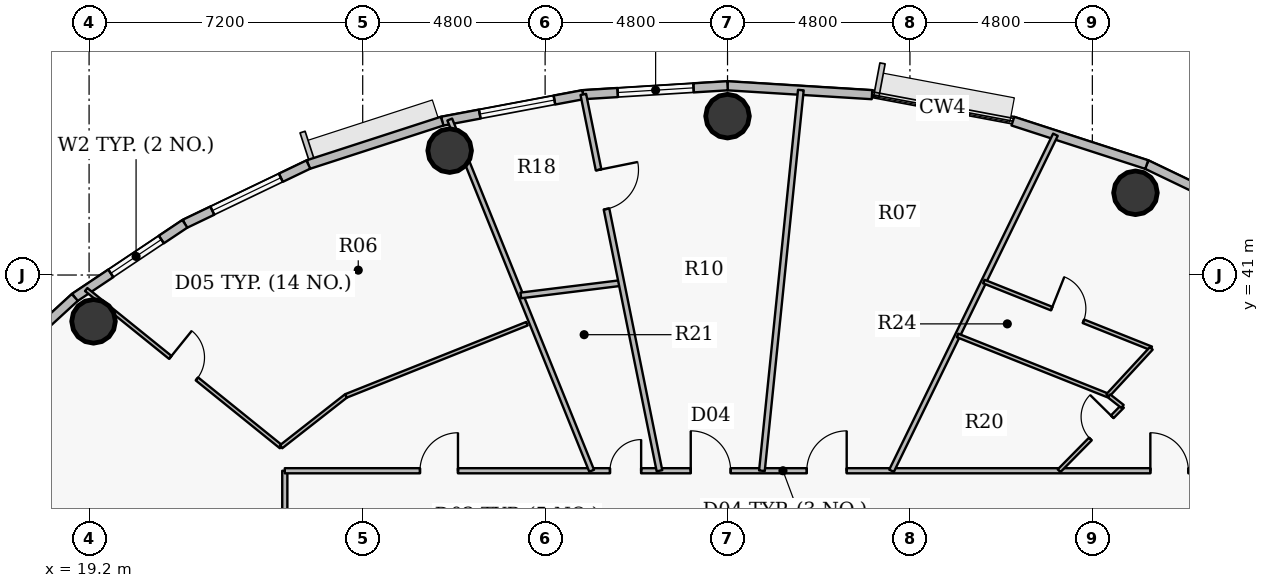
"""IFC4 building model, lengths in metres.
Left out: names, types, materials, properties, quantities, classifications, styles, units other than length and angle.
Written with IfcOpenShell. Run it as: python <this file> out.ifc"""

import sys

from ifc_helpers import new_model, si_unit, direction, frame, frame_2d, origin, origin_2d, place, context, subcontext, project, spatial, rectangle, hollow_circle, extrude, source, transform, mapped, element, fill, save


model = new_model("IFC4")
c1 = context("Model", 3, precision=1e-05, world=origin(), true_north=direction((0.0, 1.0)))
c2 = subcontext(c1, "Body", "Model", "MODEL_VIEW")
j1 = project(units=[si_unit("LENGTHUNIT", "METRE"), si_unit("PLANEANGLEUNIT", "RADIAN")], contexts=[c1])
p1 = place(None, origin())
s1 = spatial("IfcSite", under=j1, at=p1, CompositionType="ELEMENT")
p2 = place(p1, origin())
s2 = spatial("IfcBuilding", under=s1, at=p2, CompositionType="ELEMENT")
p3 = place(p2, frame((0.0, 0.0, 225.3)))
s3 = spatial("IfcBuildingStorey", under=s2, at=p3, CompositionType="ELEMENT", Elevation=225.3)
for number, where, z_axis, x_axis in (
    (1, (46.735, 43.164, 0.0), (0.0, 0.0, 1.0), (1.0, 0.0, 0.0)),
    (2, (36.0, 45.18, 0.0), (0.0, 0.0, 1.0), (1.0, 0.0, 0.0)),
    (3, (28.688, 44.273, 0.0), (0.0, 0.0, 1.0), (1.0, 0.0, 0.0)),
    (4, (19.317, 39.781, 0.0), (0.0, 0.0, 1.0), (1.0, 0.0, 0.0)),
):
    element("IfcColumn", number, at=place(p3, frame(where, z_axis=z_axis, x_axis=x_axis)), inside=s3, PredefinedType="COLUMN", context=c2, shape_type="SweptSolid", body=[
        extrude(hollow_circle(Radius=0.575, WallThickness=0.036, at=origin_2d()), origin(), (0.0, 0.0, 1.0), 3.75),
    ])
p4 = place(p3, frame((47.031, 43.906, 0.0), z_axis=(0.0, 0.0, 1.0), x_axis=(0.901598104751, -0.432574684313, 0.0)))
e5 = element("IfcWall", 5, at=p4, inside=s3, PredefinedType="SOLIDWALL", context=c2, shape_type="SweptSolid", body=[
    extrude(rectangle(XDim=3.604, YDim=0.24, at=frame_2d((1.802, 0.0))), origin(), (0.0, 0.0, 1.0), 3.5),
])
p5 = place(p3, frame((43.509, 45.049, 0.0), z_axis=(0.0, 0.0, 1.0), x_axis=(0.951210789182, -0.308541787354, 0.0)))
e6 = element("IfcWall", 6, at=p5, inside=s3, PredefinedType="SOLIDWALL", context=c2, shape_type="SweptSolid", body=[
    extrude(rectangle(XDim=3.702, YDim=0.24, at=frame_2d((1.851, 0.0))), origin(), (0.0, 0.0, 1.0), 3.5),
])
p6 = place(p3, frame((36.0, 45.98, 0.0), z_axis=(0.0, 0.0, 1.0), x_axis=(0.998108785312, -0.06147237333, 0.0)))
e7 = element("IfcWall", 7, at=p6, inside=s3, PredefinedType="SOLIDWALL", context=c2, shape_type="SweptSolid", body=[
    extrude(rectangle(XDim=3.809, YDim=0.24, at=frame_2d((1.904, 0.0))), origin(), (0.0, 0.0, 1.0), 3.5),
])
p7 = place(p3, frame((32.198, 45.746, 0.0), z_axis=(0.0, 0.0, 1.0), x_axis=(0.998108785312, 0.06147237333, 0.0)))
e8 = element("IfcWall", 8, at=p7, inside=s3, PredefinedType="SOLIDWALL", context=c2, shape_type="SweptSolid", body=[
    extrude(rectangle(XDim=3.809, YDim=0.24, at=frame_2d((1.904, 0.0))), origin(), (0.0, 0.0, 1.0), 3.5),
])
p8 = place(p7, frame((0.913, 0.0, 0.9)))
e9 = element("IfcOpeningElement", 9, at=p8, cuts=e8, PredefinedType="OPENING", context=c2, shape_type="SweptSolid", body=[
    extrude(rectangle(XDim=2.0, YDim=1.75, at=origin_2d()), frame((1.0, 0.13, 0.875), z_axis=(0.0, -1.0, 0.0), x_axis=(1.0, 0.0, 0.0)), (0.0, 0.0, 1.0), 0.26),
])
p9 = place(p3, frame((28.491, 45.049, 0.0), z_axis=(0.0, 0.0, 1.0), x_axis=(0.982784898575, 0.184753465822, 0.0)))
e10 = element("IfcWall", 10, at=p9, inside=s3, PredefinedType="SOLIDWALL", context=c2, shape_type="SweptSolid", body=[
    extrude(rectangle(XDim=3.773, YDim=0.24, at=frame_2d((1.886, 0.0))), origin(), (0.0, 0.0, 1.0), 3.5),
])
p10 = place(p9, frame((1.006, 0.0, 0.9)))
e11 = element("IfcOpeningElement", 11, at=p10, cuts=e10, PredefinedType="OPENING", context=c2, shape_type="SweptSolid", body=[
    extrude(rectangle(XDim=2.0, YDim=1.75, at=origin_2d()), frame((1.0, 0.13, 0.875), z_axis=(0.0, -1.0, 0.0), x_axis=(1.0, 0.0, 0.0)), (0.0, 0.0, 1.0), 0.26),
])
p11 = place(p3, frame((24.969, 43.906, 0.0), z_axis=(0.0, 0.0, 1.0), x_axis=(0.951210789182, 0.308541787354, 0.0)))
e12 = element("IfcWall", 12, at=p11, inside=s3, PredefinedType="SOLIDWALL", context=c2, shape_type="SweptSolid", body=[
    extrude(rectangle(XDim=3.702, YDim=0.24, at=frame_2d((1.851, 0.0))), origin(), (0.0, 0.0, 1.0), 3.5),
])
p12 = place(p3, frame((21.72, 42.348, 0.0), z_axis=(0.0, 0.0, 1.0), x_axis=(0.901598104751, 0.432574684313, 0.0)))
e13 = element("IfcWall", 13, at=p12, inside=s3, PredefinedType="SOLIDWALL", context=c2, shape_type="SweptSolid", body=[
    extrude(rectangle(XDim=3.604, YDim=0.24, at=frame_2d((1.802, 0.0))), origin(), (0.0, 0.0, 1.0), 3.5),
])
p13 = place(p12, frame((0.802, 0.0, 0.9)))
e14 = element("IfcOpeningElement", 14, at=p13, cuts=e13, PredefinedType="OPENING", context=c2, shape_type="SweptSolid", body=[
    extrude(rectangle(XDim=2.0, YDim=1.75, at=origin_2d()), frame((1.0, 0.13, 0.875), z_axis=(0.0, -1.0, 0.0), x_axis=(1.0, 0.0, 0.0)), (0.0, 0.0, 1.0), 0.26),
])
p14 = place(p3, frame((18.824, 40.411, 0.0), z_axis=(0.0, 0.0, 1.0), x_axis=(0.831262496074, 0.555880079352, 0.0)))
e15 = element("IfcWall", 15, at=p14, inside=s3, PredefinedType="SOLIDWALL", context=c2, shape_type="SweptSolid", body=[
    extrude(rectangle(XDim=3.484, YDim=0.24, at=frame_2d((1.742, 0.0))), origin(), (0.0, 0.0, 1.0), 3.5),
])
p15 = place(p14, frame((1.14, 0.0, 0.9)))
e16 = element("IfcOpeningElement", 16, at=p15, cuts=e15, PredefinedType="OPENING", context=c2, shape_type="SweptSolid", body=[
    extrude(rectangle(XDim=1.6, YDim=1.75, at=origin_2d()), frame((0.8, 0.13, 0.875), z_axis=(0.0, -1.0, 0.0), x_axis=(1.0, 0.0, 0.0)), (0.0, 0.0, 1.0), 0.26),
])
p16 = place(p3, frame((16.352, 38.145, 0.0), z_axis=(0.0, 0.0, 1.0), x_axis=(0.737123922599, 0.675757591694, 0.0)))
e17 = element("IfcWall", 17, at=p16, inside=s3, PredefinedType="SOLIDWALL", context=c2, shape_type="SweptSolid", body=[
    extrude(rectangle(XDim=3.354, YDim=0.24, at=frame_2d((1.677, 0.0))), origin(), (0.0, 0.0, 1.0), 3.5),
])
p17 = place(p16, frame((1.144, 0.0, 0.9)))
e18 = element("IfcOpeningElement", 18, at=p17, cuts=e17, PredefinedType="OPENING", context=c2, shape_type="SweptSolid", body=[
    extrude(rectangle(XDim=1.25, YDim=1.65, at=origin_2d()), frame((0.625, 0.13, 0.825), z_axis=(0.0, -1.0, 0.0), x_axis=(1.0, 0.0, 0.0)), (0.0, 0.0, 1.0), 0.26),
])
p18 = place(p3, frame((19.124, 40.618, 0.0), z_axis=(0.0, 0.0, 1.0), x_axis=(0.778207956818, -0.62800666871, 0.0)))
e19 = element("IfcWall", 19, at=p18, inside=s3, PredefinedType="PARTITIONING", context=c2, shape_type="SweptSolid", body=[
    extrude(rectangle(XDim=6.588, YDim=0.1, at=frame_2d((3.294, 0.0))), origin(), (0.0, 0.0, 1.0), 2.985),
])
p19 = place(p18, frame((2.844, 0.0, 0.0)))
e20 = element("IfcOpeningElement", 20, at=p19, cuts=e19, PredefinedType="OPENING", context=c2, shape_type="SweptSolid", body=[
    extrude(rectangle(XDim=0.9, YDim=2.1, at=origin_2d()), frame((0.45, 0.06, 1.05), z_axis=(0.0, -1.0, 0.0), x_axis=(1.0, 0.0, 0.0)), (0.0, 0.0, 1.0), 0.12),
])
p20 = place(p3, frame((24.251, 36.481, 0.0), z_axis=(0.0, 0.0, 1.0), x_axis=(0.787374491509, 0.616474987426, 0.0)))
e21 = element("IfcWall", 21, at=p20, inside=s3, PredefinedType="PARTITIONING", context=c2, shape_type="SweptSolid", body=[
    extrude(rectangle(XDim=2.171, YDim=0.1, at=frame_2d((1.086, 0.0))), origin(), (0.0, 0.0, 1.0), 3.5),
])
p21 = place(p3, frame((24.35, 27.95, 0.0), z_axis=(0.0, 0.0, 1.0), x_axis=(0.0, 1.0, 0.0)))
e22 = element("IfcWall", 22, at=p21, inside=s3, PredefinedType="PARTITIONING", context=c2, shape_type="SweptSolid", body=[
    extrude(rectangle(XDim=7.9, YDim=0.135, at=frame_2d((3.95, 0.0))), origin(), (0.0, 0.0, 1.0), 2.935),
])
p22 = place(p3, frame((24.35, 35.85, 0.0), z_axis=(0.0, 0.0, 1.0), x_axis=(1.0, 0.0, 0.0)))
e23 = element("IfcWall", 23, at=p22, inside=s3, PredefinedType="PARTITIONING", context=c2, shape_type="SweptSolid", body=[
    extrude(rectangle(XDim=26.218, YDim=0.135, at=frame_2d((13.109, 0.0))), origin(), (0.0, 0.0, 1.0), 2.935),
])
p23 = place(p22, frame((3.557, 0.0, 0.0)))
e24 = element("IfcOpeningElement", 24, at=p23, cuts=e23, PredefinedType="OPENING", context=c2, shape_type="SweptSolid", body=[
    extrude(rectangle(XDim=1.0, YDim=2.15, at=origin_2d()), frame((0.5, 0.078, 1.075), z_axis=(0.0, -1.0, 0.0), x_axis=(1.0, 0.0, 0.0)), (0.0, 0.0, 1.0), 0.155),
])
p24 = place(p22, frame((22.776, 0.0, 0.0)))
e25 = element("IfcOpeningElement", 25, at=p24, cuts=e23, PredefinedType="OPENING", context=c2, shape_type="SweptSolid", body=[
    extrude(rectangle(XDim=1.0, YDim=2.15, at=origin_2d()), frame((0.5, 0.078, 1.075), z_axis=(0.0, -1.0, 0.0), x_axis=(1.0, 0.0, 0.0)), (0.0, 0.0, 1.0), 0.155),
])
p25 = place(p22, frame((13.736, 0.0, 0.0)))
e26 = element("IfcOpeningElement", 26, at=p25, cuts=e23, PredefinedType="OPENING", context=c2, shape_type="SweptSolid", body=[
    extrude(rectangle(XDim=1.05, YDim=2.15, at=origin_2d()), frame((0.525, 0.078, 1.075), z_axis=(0.0, -1.0, 0.0), x_axis=(1.0, 0.0, 0.0)), (0.0, 0.0, 1.0), 0.155),
])
p26 = place(p22, frame((10.682, 0.0, 0.0)))
e27 = element("IfcOpeningElement", 27, at=p26, cuts=e23, PredefinedType="OPENING", context=c2, shape_type="SweptSolid", body=[
    extrude(rectangle(XDim=1.05, YDim=2.15, at=origin_2d()), frame((0.525, 0.078, 1.075), z_axis=(0.0, -1.0, 0.0), x_axis=(1.0, 0.0, 0.0)), (0.0, 0.0, 1.0), 0.155),
])
p27 = place(p22, frame((8.557, 0.0, 0.0)))
e28 = element("IfcOpeningElement", 28, at=p27, cuts=e23, PredefinedType="OPENING", context=c2, shape_type="SweptSolid", body=[
    extrude(rectangle(XDim=0.82, YDim=2.1, at=origin_2d()), frame((0.41, 0.078, 1.05), z_axis=(0.0, -1.0, 0.0), x_axis=(1.0, 0.0, 0.0)), (0.0, 0.0, 1.0), 0.155),
])
p28 = place(p3, frame((25.961, 37.819, 0.0), z_axis=(0.0, 0.0, 1.0), x_axis=(0.928801505367, 0.370577608105, 0.0)))
e29 = element("IfcWall", 29, at=p28, inside=s3, PredefinedType="PARTITIONING", context=c2, shape_type="SweptSolid", body=[
    extrude(rectangle(XDim=5.126, YDim=0.1, at=frame_2d((2.563, 0.0))), origin(), (0.0, 0.0, 1.0), 2.935),
])
p29 = place(p3, frame((28.691, 45.091, 0.0), z_axis=(0.0, 0.0, 1.0), x_axis=(0.37459385956, -0.927188999277, 0.0)))
e30 = element("IfcWall", 30, at=p29, inside=s3, PredefinedType="PARTITIONING", context=c2, shape_type="SweptSolid", body=[
    extrude(rectangle(XDim=9.967, YDim=0.135, at=frame_2d((4.984, 0.0))), origin(), (0.0, 0.0, 1.0), 2.935),
])
p30 = place(p3, frame((30.561, 40.463, 0.0), z_axis=(0.0, 0.0, 1.0), x_axis=(0.992402619978, 0.123032678023, 0.0)))
e31 = element("IfcWall", 31, at=p30, inside=s3, PredefinedType="PARTITIONING", context=c2, shape_type="SweptSolid", body=[
    extrude(rectangle(XDim=2.669, YDim=0.15, at=frame_2d((1.334, 0.0))), origin(), (0.0, 0.0, 1.0), 3.5),
])
p31 = place(p3, frame((32.206, 45.751, 0.0), z_axis=(0.0, 0.0, 1.0), x_axis=(0.198323299654, -0.980136658234, 0.0)))
e32 = element("IfcWall", 32, at=p31, inside=s3, PredefinedType="PARTITIONING", context=c2, shape_type="SweptSolid", body=[
    extrude(rectangle(XDim=10.102, YDim=0.15, at=frame_2d((5.051, 0.0))), origin(), (0.0, 0.0, 1.0), 2.985),
])
p32 = place(p31, frame((2.025, 0.0, 0.0)))
e33 = element("IfcOpeningElement", 33, at=p32, cuts=e32, PredefinedType="OPENING", context=c2, shape_type="SweptSolid", body=[
    extrude(rectangle(XDim=1.05, YDim=2.15, at=origin_2d()), frame((0.525, 0.085, 1.075), z_axis=(0.0, -1.0, 0.0), x_axis=(1.0, 0.0, 0.0)), (0.0, 0.0, 1.0), 0.17),
])
p33 = place(p3, frame((36.905, 35.85, 0.0), z_axis=(0.0, 0.0, 1.0), x_axis=(0.101745833159, 0.994810426883, 0.0)))
e34 = element("IfcWall", 34, at=p33, inside=s3, PredefinedType="PARTITIONING", context=c2, shape_type="SweptSolid", body=[
    extrude(rectangle(XDim=10.068, YDim=0.15, at=frame_2d((5.034, 0.0))), origin(), (0.0, 0.0, 1.0), 2.985),
])
p34 = place(p3, frame((40.316, 35.85, 0.0), z_axis=(0.0, 0.0, 1.0), x_axis=(0.438375708348, 0.898791821464, 0.0)))
e35 = element("IfcWall", 35, at=p34, inside=s3, PredefinedType="PARTITIONING", context=c2, shape_type="SweptSolid", body=[
    extrude(rectangle(XDim=9.836, YDim=0.135, at=frame_2d((4.918, 0.0))), origin(), (0.0, 0.0, 1.0), 2.985),
])
p35 = place(p3, frame((42.053, 39.41, 0.0), z_axis=(0.0, 0.0, 1.0), x_axis=(0.928800647075, -0.370579759286, 0.0)))
e36 = element("IfcWall", 36, at=p35, inside=s3, PredefinedType="PARTITIONING", context=c2, shape_type="SweptSolid", body=[
    extrude(rectangle(XDim=4.257, YDim=0.1, at=frame_2d((2.129, 0.0))), origin(), (0.0, 0.0, 1.0), 2.935),
])
p36 = place(p3, frame((42.744, 40.828, 0.0), z_axis=(0.0, 0.0, 1.0), x_axis=(0.928817025393, -0.370538706939, 0.0)))
e37 = element("IfcWall", 37, at=p36, inside=s3, PredefinedType="PARTITIONING", context=c2, shape_type="SweptSolid", body=[
    extrude(rectangle(XDim=4.744, YDim=0.1, at=frame_2d((2.372, 0.0))), origin(), (0.0, 0.0, 1.0), 2.935),
])
p37 = place(p36, frame((1.922, 0.0, 0.0)))
e38 = element("IfcOpeningElement", 38, at=p37, cuts=e37, PredefinedType="OPENING", context=c2, shape_type="SweptSolid", body=[
    extrude(rectangle(XDim=0.9, YDim=2.1, at=origin_2d()), frame((0.45, 0.06, 1.05), z_axis=(0.0, -1.0, 0.0), x_axis=(1.0, 0.0, 0.0)), (0.0, 0.0, 1.0), 0.12),
])
p38 = place(p3, frame((44.724, 35.85, 0.0), z_axis=(0.0, 0.0, 1.0), x_axis=(0.702107196604, 0.712071263622, 0.0)))
e39 = element("IfcWall", 39, at=p38, inside=s3, PredefinedType="PARTITIONING", context=c2, shape_type="SweptSolid", body=[
    extrude(rectangle(XDim=2.377, YDim=0.1, at=frame_2d((1.188, 0.0))), origin(), (0.0, 0.0, 1.0), 3.5),
])
p39 = place(p38, frame((1.173, 0.0, 0.0)))
e40 = element("IfcOpeningElement", 40, at=p39, cuts=e39, PredefinedType="OPENING", context=c2, shape_type="SweptSolid", body=[
    extrude(rectangle(XDim=0.82, YDim=2.1, at=origin_2d()), frame((0.41, 0.06, 1.05), z_axis=(0.0, -1.0, 0.0), x_axis=(1.0, 0.0, 0.0)), (0.0, 0.0, 1.0), 0.12),
])
p40 = place(p3, frame((46.007, 37.832, 0.0), z_axis=(0.0, 0.0, 1.0), x_axis=(0.678598883011, 0.734509057791, 0.0)))
e41 = element("IfcWall", 41, at=p40, inside=s3, PredefinedType="PARTITIONING", context=c2, shape_type="SweptSolid", body=[
    extrude(rectangle(XDim=1.686, YDim=0.1, at=frame_2d((0.843, 0.0))), origin(), (0.0, 0.0, 1.0), 3.125),
])
p41 = place(p3, frame((46.039, 37.819, 0.0), z_axis=(0.0, 0.0, 1.0), x_axis=(0.787505001008, -0.616308261658, 0.0)))
e42 = element("IfcWall", 42, at=p41, inside=s3, PredefinedType="PARTITIONING", context=c2, shape_type="SweptSolid", body=[
    extrude(rectangle(XDim=0.449, YDim=0.1, at=frame_2d((0.225, 0.0))), origin(), (0.0, 0.0, 1.0), 3.5),
])
m1 = source(origin(), c2, "Body", "SweptSolid", [
    extrude(rectangle(XDim=2.0, YDim=1.75, at=origin_2d()), frame((1.0, 0.03, 0.875), z_axis=(0.0, -1.0, 0.0), x_axis=(1.0, 0.0, 0.0)), (0.0, 0.0, 1.0), 0.06),
])
p42 = place(p8, origin())
e43 = element("IfcWindow", 43, at=p42, inside=s3, PartitioningType="DOUBLE_PANEL_VERTICAL", PredefinedType="WINDOW", context=c2, shape_type="MappedRepresentation", body=[
    mapped(m1, transform((0.0, 0.0, 0.0), x_axis=(1.0, 0.0, 0.0), y_axis=(0.0, 1.0, 0.0), z_axis=(0.0, 0.0, 1.0), scale=1.0)),
])
fill(e9, e43)
p43 = place(p10, origin())
e44 = element("IfcWindow", 44, at=p43, inside=s3, PartitioningType="DOUBLE_PANEL_VERTICAL", PredefinedType="WINDOW", context=c2, shape_type="MappedRepresentation", body=[
    mapped(m1, transform((0.0, 0.0, 0.0), x_axis=(1.0, 0.0, 0.0), y_axis=(0.0, 1.0, 0.0), z_axis=(0.0, 0.0, 1.0), scale=1.0)),
])
fill(e11, e44)
p44 = place(p13, origin())
e45 = element("IfcWindow", 45, at=p44, inside=s3, PartitioningType="DOUBLE_PANEL_VERTICAL", PredefinedType="WINDOW", context=c2, shape_type="MappedRepresentation", body=[
    mapped(m1, transform((0.0, 0.0, 0.0), x_axis=(1.0, 0.0, 0.0), y_axis=(0.0, 1.0, 0.0), z_axis=(0.0, 0.0, 1.0), scale=1.0)),
])
fill(e14, e45)
m2 = source(origin(), c2, "Body", "SweptSolid", [
    extrude(rectangle(XDim=1.6, YDim=1.75, at=origin_2d()), frame((0.8, 0.03, 0.875), z_axis=(0.0, -1.0, 0.0), x_axis=(1.0, 0.0, 0.0)), (0.0, 0.0, 1.0), 0.06),
])
p45 = place(p15, origin())
e46 = element("IfcWindow", 46, at=p45, inside=s3, PartitioningType="DOUBLE_PANEL_VERTICAL", PredefinedType="WINDOW", context=c2, shape_type="MappedRepresentation", body=[
    mapped(m2, transform((0.0, 0.0, 0.0), x_axis=(1.0, 0.0, 0.0), y_axis=(0.0, 1.0, 0.0), z_axis=(0.0, 0.0, 1.0), scale=1.0)),
])
fill(e16, e46)
m3 = source(origin(), c2, "Body", "SweptSolid", [
    extrude(rectangle(XDim=1.0, YDim=2.15, at=origin_2d()), frame((0.5, 0.025, 1.075), z_axis=(0.0, -1.0, 0.0), x_axis=(1.0, 0.0, 0.0)), (0.0, 0.0, 1.0), 0.05),
])
p46 = place(p23, origin())
e47 = element("IfcDoor", 47, at=p46, inside=s3, OperationType="SINGLE_SWING_RIGHT", PredefinedType="DOOR", context=c2, shape_type="MappedRepresentation", body=[
    mapped(m3, transform((0.0, 0.0, 0.0), x_axis=(1.0, 0.0, 0.0), y_axis=(0.0, 1.0, 0.0), z_axis=(0.0, 0.0, 1.0), scale=1.0)),
])
fill(e24, e47)
m4 = source(origin(), c2, "Body", "SweptSolid", [
    extrude(rectangle(XDim=0.9, YDim=2.1, at=origin_2d()), frame((0.45, 0.025, 1.05), z_axis=(0.0, -1.0, 0.0), x_axis=(1.0, 0.0, 0.0)), (0.0, 0.0, 1.0), 0.05),
])
p47 = place(p19, origin())
e48 = element("IfcDoor", 48, at=p47, inside=s3, OperationType="SINGLE_SWING_LEFT", PredefinedType="DOOR", context=c2, shape_type="MappedRepresentation", body=[
    mapped(m4, transform((0.0, 0.0, 0.0), x_axis=(1.0, 0.0, 0.0), y_axis=(0.0, 1.0, 0.0), z_axis=(0.0, 0.0, 1.0), scale=1.0)),
])
fill(e20, e48)
p48 = place(p24, origin())
e49 = element("IfcDoor", 49, at=p48, inside=s3, OperationType="SINGLE_SWING_LEFT", PredefinedType="DOOR", context=c2, shape_type="MappedRepresentation", body=[
    mapped(m3, transform((0.0, 0.0, 0.0), x_axis=(1.0, 0.0, 0.0), y_axis=(0.0, 1.0, 0.0), z_axis=(0.0, 0.0, 1.0), scale=1.0)),
])
fill(e25, e49)
m5 = source(origin(), c2, "Body", "SweptSolid", [
    extrude(rectangle(XDim=0.82, YDim=2.1, at=origin_2d()), frame((0.41, 0.025, 1.05), z_axis=(0.0, -1.0, 0.0), x_axis=(1.0, 0.0, 0.0)), (0.0, 0.0, 1.0), 0.05),
])
p49 = place(p39, origin())
e50 = element("IfcDoor", 50, at=p49, inside=s3, OperationType="SINGLE_SWING_RIGHT", PredefinedType="DOOR", context=c2, shape_type="MappedRepresentation", body=[
    mapped(m5, transform((0.0, 0.0, 0.0), x_axis=(1.0, 0.0, 0.0), y_axis=(0.0, 1.0, 0.0), z_axis=(0.0, 0.0, 1.0), scale=1.0)),
])
fill(e40, e50)
p50 = place(p37, origin())
e51 = element("IfcDoor", 51, at=p50, inside=s3, OperationType="SINGLE_SWING_LEFT", PredefinedType="DOOR", context=c2, shape_type="MappedRepresentation", body=[
    mapped(m4, transform((0.0, 0.0, 0.0), x_axis=(1.0, 0.0, 0.0), y_axis=(0.0, 1.0, 0.0), z_axis=(0.0, 0.0, 1.0), scale=1.0)),
])
fill(e38, e51)
m6 = source(origin(), c2, "Body", "SweptSolid", [
    extrude(rectangle(XDim=1.05, YDim=2.15, at=origin_2d()), frame((0.525, 0.025, 1.075), z_axis=(0.0, -1.0, 0.0), x_axis=(1.0, 0.0, 0.0)), (0.0, 0.0, 1.0), 0.05),
])
p51 = place(p25, origin())
e52 = element("IfcDoor", 52, at=p51, inside=s3, OperationType="SINGLE_SWING_RIGHT", PredefinedType="DOOR", context=c2, shape_type="MappedRepresentation", body=[
    mapped(m6, transform((0.0, 0.0, 0.0), x_axis=(1.0, 0.0, 0.0), y_axis=(0.0, 1.0, 0.0), z_axis=(0.0, 0.0, 1.0), scale=1.0)),
])
fill(e26, e52)
p52 = place(p26, origin())
e53 = element("IfcDoor", 53, at=p52, inside=s3, OperationType="SINGLE_SWING_LEFT", PredefinedType="DOOR", context=c2, shape_type="MappedRepresentation", body=[
    mapped(m6, transform((0.0, 0.0, 0.0), x_axis=(1.0, 0.0, 0.0), y_axis=(0.0, 1.0, 0.0), z_axis=(0.0, 0.0, 1.0), scale=1.0)),
])
fill(e27, e53)
p53 = place(p27, origin())
e54 = element("IfcDoor", 54, at=p53, inside=s3, OperationType="SINGLE_SWING_RIGHT", PredefinedType="DOOR", context=c2, shape_type="MappedRepresentation", body=[
    mapped(m5, transform((0.0, 0.0, 0.0), x_axis=(1.0, 0.0, 0.0), y_axis=(0.0, 1.0, 0.0), z_axis=(0.0, 0.0, 1.0), scale=1.0)),
])
fill(e28, e54)
p54 = place(p32, origin())
e55 = element("IfcDoor", 55, at=p54, inside=s3, OperationType="SINGLE_SWING_LEFT", PredefinedType="DOOR", context=c2, shape_type="MappedRepresentation", body=[
    mapped(m6, transform((0.0, 0.0, 0.0), x_axis=(1.0, 0.0, 0.0), y_axis=(0.0, 1.0, 0.0), z_axis=(0.0, 0.0, 1.0), scale=1.0)),
])
fill(e33, e55)
save(model, sys.argv[1])
